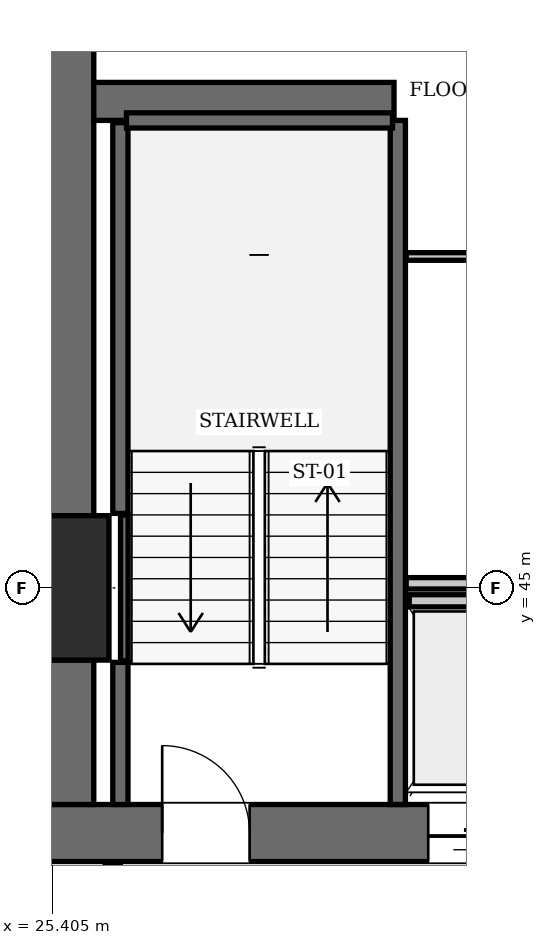
"""IFC4 building model, lengths in metres.
Left out: names, types, materials, properties, quantities, classifications, styles, units other than length and angle.
Written with IfcOpenShell. Run it as: python <this file> out.ifc"""

import sys

from ifc_helpers import new_model, si_unit, direction, frame, frame_2d, origin, origin_2d, place, context, subcontext, project, spatial, rectangle, extrude, element, fill, save


model = new_model("IFC4")
c1 = context("Model", 3, precision=1e-05, world=origin(), true_north=direction((0.0, 1.0)))
c2 = subcontext(c1, "Body", "Model", "MODEL_VIEW")
j1 = project(units=[si_unit("LENGTHUNIT", "METRE"), si_unit("PLANEANGLEUNIT", "RADIAN")], contexts=[c1])
p1 = place(None, origin())
s1 = spatial("IfcSite", under=j1, at=p1, CompositionType="ELEMENT")
p2 = place(p1, origin())
s2 = spatial("IfcBuilding", under=s1, at=p2, CompositionType="ELEMENT")
p3 = place(p2, frame((0.0, 0.0, 173.6)))
s3 = spatial("IfcBuildingStorey", under=s2, at=p3, CompositionType="ELEMENT", Elevation=173.6)
p4 = place(p3, frame((25.2, 45.0, 0.0), z_axis=(0.0, 0.0, 1.0), x_axis=(1.0, 0.0, 0.0)))
e1 = element("IfcColumn", 1, at=p4, inside=s3, PredefinedType="COLUMN", context=c2, shape_type="SweptSolid", body=[
    extrude(rectangle(XDim=1.9, YDim=1.9, at=origin_2d()), origin(), (0.0, 0.0, 1.0), 3.85),
])
p5 = place(p3, frame((25.2, 41.775, 0.0), z_axis=(0.0, 0.0, 1.0), x_axis=(1.0, 0.0, 0.0)))
e2 = element("IfcWall", 2, at=p5, inside=s3, PredefinedType="SHEAR", context=c2, shape_type="SweptSolid", body=[
    extrude(rectangle(XDim=6.8, YDim=0.75, at=frame_2d((3.4, 0.0))), origin(), (0.0, 0.0, 1.0), 3.85),
])
p6 = place(p5, frame((1.65, 0.0, 0.0)))
e3 = element("IfcOpeningElement", 3, at=p6, cuts=e2, PredefinedType="OPENING", context=c2, shape_type="SweptSolid", body=[
    extrude(rectangle(XDim=1.15, YDim=2.15, at=frame_2d((0.575, 1.075))), frame((0.0, 0.385, 0.0), z_axis=(0.0, -1.0, 0.0), x_axis=(1.0, 0.0, 0.0)), (0.0, 0.0, 1.0), 0.77),
])
p7 = place(p5, frame((5.15, 0.0, 0.0)))
e4 = element("IfcOpeningElement", 4, at=p7, cuts=e2, PredefinedType="OPENING", context=c2, shape_type="SweptSolid", body=[
    extrude(rectangle(XDim=1.1, YDim=2.2, at=frame_2d((0.55, 1.1))), frame((0.0, 0.385, 0.0), z_axis=(0.0, -1.0, 0.0), x_axis=(1.0, 0.0, 0.0)), (0.0, 0.0, 1.0), 0.77),
])
p8 = place(p3, frame((25.575, 42.15, 0.0), z_axis=(0.0, 0.0, 1.0), x_axis=(0.0, 1.0, 0.0)))
e5 = element("IfcWall", 5, at=p8, inside=s3, PredefinedType="SHEAR", context=c2, shape_type="SweptSolid", body=[
    extrude(rectangle(XDim=1.9, YDim=0.75, at=frame_2d((0.95, 0.0))), origin(), (0.0, 0.0, 1.0), 3.85),
])
p9 = place(p3, frame((25.575, 45.95, 0.0), z_axis=(0.0, 0.0, 1.0), x_axis=(0.0, 1.0, 0.0)))
e6 = element("IfcWall", 6, at=p9, inside=s3, PredefinedType="SHEAR", context=c2, shape_type="SweptSolid", body=[
    extrude(rectangle(XDim=7.3, YDim=0.75, at=frame_2d((3.65, 0.0))), origin(), (0.0, 0.0, 1.0), 3.85),
])
p10 = place(p3, frame((25.95, 51.4, 0.0), z_axis=(0.0, 0.0, 1.0), x_axis=(1.0, 0.0, 0.0)))
e7 = element("IfcWall", 7, at=p10, inside=s3, PredefinedType="SHEAR", context=c2, shape_type="SweptSolid", body=[
    extrude(rectangle(XDim=3.95, YDim=0.5, at=frame_2d((1.975, 0.0))), origin(), (0.0, 0.0, 1.0), 3.85),
])
p11 = place(p3, frame((29.95, 42.15, 0.0), z_axis=(0.0, 0.0, 1.0), x_axis=(0.0, 1.0, 0.0)))
e8 = element("IfcWall", 8, at=p11, inside=s3, PredefinedType="SOLIDWALL", context=c2, shape_type="SweptSolid", body=[
    extrude(rectangle(XDim=9.0, YDim=0.2, at=frame_2d((4.5, 0.0))), origin(), (0.0, 0.0, 1.0), 3.61),
])
p12 = place(p3, frame((26.3, 42.15, 0.0), z_axis=(0.0, 0.0, 1.0), x_axis=(0.0, 1.0, 0.0)))
e9 = element("IfcWall", 9, at=p12, inside=s3, PredefinedType="SOLIDWALL", context=c2, shape_type="SweptSolid", body=[
    extrude(rectangle(XDim=1.87, YDim=0.2, at=frame_2d((0.935, 0.0))), origin(), (0.0, 0.0, 1.0), 3.61),
])
p13 = place(p3, frame((26.3, 45.98, 0.0), z_axis=(0.0, 0.0, 1.0), x_axis=(0.0, 1.0, 0.0)))
e10 = element("IfcWall", 10, at=p13, inside=s3, PredefinedType="SOLIDWALL", context=c2, shape_type="SweptSolid", body=[
    extrude(rectangle(XDim=5.14, YDim=0.2, at=frame_2d((2.57, 0.0))), origin(), (0.0, 0.0, 1.0), 3.61),
])
p14 = place(p3, frame((26.38, 51.15, 0.0), z_axis=(0.0, 0.0, 1.0), x_axis=(1.0, 0.0, 0.0)))
e11 = element("IfcWall", 11, at=p14, inside=s3, PredefinedType="SOLIDWALL", context=c2, shape_type="SweptSolid", body=[
    extrude(rectangle(XDim=3.5, YDim=0.2, at=frame_2d((1.75, 0.0))), origin(), (0.0, 0.0, 1.0), 3.61),
])
p15 = place(p3, frame((26.352, 44.04, 0.0), z_axis=(0.0, 0.0, 1.0), x_axis=(0.0, 1.0, 0.0)))
e12 = element("IfcWall", 12, at=p15, inside=s3, PredefinedType="SOLIDWALL", context=c2, shape_type="SweptSolid", body=[
    extrude(rectangle(XDim=1.92, YDim=0.1, at=frame_2d((0.96, 0.0))), origin(), (0.0, 0.0, 1.0), 3.61),
])
p16 = place(p3, frame((30.1, 44.83, 0.0), z_axis=(0.0, 0.0, 1.0), x_axis=(1.0, 0.0, 0.0)))
e13 = element("IfcWall", 13, at=p16, inside=s3, PredefinedType="SOLIDWALL", context=c2, shape_type="SweptSolid", body=[
    extrude(rectangle(XDim=1.6, YDim=0.16, at=frame_2d((0.8, 0.0))), origin(), (0.0, 0.0, 1.0), 3.61),
])
p17 = place(p3, frame((26.2, 38.31, 0.0), z_axis=(0.0, 0.0, 1.0), x_axis=(0.0, 1.0, 0.0)))
e14 = element("IfcWall", 14, at=p17, inside=s3, PredefinedType="PARTITIONING", context=c2, shape_type="SweptSolid", body=[
    extrude(rectangle(XDim=3.07, YDim=0.2, at=frame_2d((1.535, 0.0))), origin(), (0.0, 0.0, 1.0), 3.61),
])
p18 = place(p3, frame((30.06, 45.06, 0.0), z_axis=(0.0, 0.0, 1.0), x_axis=(1.0, 0.0, 0.0)))
e15 = element("IfcWall", 15, at=p18, inside=s3, PredefinedType="PARTITIONING", context=c2, shape_type="SweptSolid", body=[
    extrude(rectangle(XDim=3.18, YDim=0.15, at=frame_2d((1.59, 0.0))), origin(), (0.0, 0.0, 1.0), 3.61),
])
p19 = place(p3, frame((30.06, 49.36, 0.0), z_axis=(0.0, 0.0, 1.0), x_axis=(1.0, 0.0, 0.0)))
e16 = element("IfcWall", 16, at=p19, inside=s3, PredefinedType="PARTITIONING", context=c2, shape_type="SweptSolid", body=[
    extrude(rectangle(XDim=3.18, YDim=0.1, at=frame_2d((1.59, 0.0))), origin(), (0.0, 0.0, 1.0), 3.61),
])
p20 = place(p19, frame((1.95, 0.0, 0.0)))
e17 = element("IfcOpeningElement", 17, at=p20, cuts=e16, PredefinedType="OPENING", context=c2, shape_type="SweptSolid", body=[
    extrude(rectangle(XDim=0.8, YDim=2.05, at=frame_2d((0.4, 1.025))), frame((0.0, 0.06, 0.0), z_axis=(0.0, -1.0, 0.0), x_axis=(1.0, 0.0, 0.0)), (0.0, 0.0, 1.0), 0.12),
])
p21 = place(p6, origin())
e18 = element("IfcDoor", 18, at=p21, inside=s3, OperationType="SINGLE_SWING_LEFT", PredefinedType="DOOR", context=c2, shape_type="SweptSolid", body=[
    extrude(rectangle(XDim=1.15, YDim=2.15, at=frame_2d((0.575, 1.075))), frame((0.0, 0.025, 0.0), z_axis=(0.0, -1.0, 0.0), x_axis=(1.0, 0.0, 0.0)), (0.0, 0.0, 1.0), 0.05),
])
fill(e3, e18)
p22 = place(p7, frame((1.1, 0.0, 0.0), z_axis=(0.0, 0.0, 1.0), x_axis=(-1.0, 0.0, 0.0)))
e19 = element("IfcDoor", 19, at=p22, inside=s3, OperationType="SLIDING_TO_LEFT", PredefinedType="DOOR", context=c2, shape_type="SweptSolid", body=[
    extrude(rectangle(XDim=1.1, YDim=2.2, at=frame_2d((0.55, 1.1))), frame((0.0, 0.025, 0.0), z_axis=(0.0, -1.0, 0.0), x_axis=(1.0, 0.0, 0.0)), (0.0, 0.0, 1.0), 0.05),
])
fill(e4, e19)
save(model, sys.argv[1])
